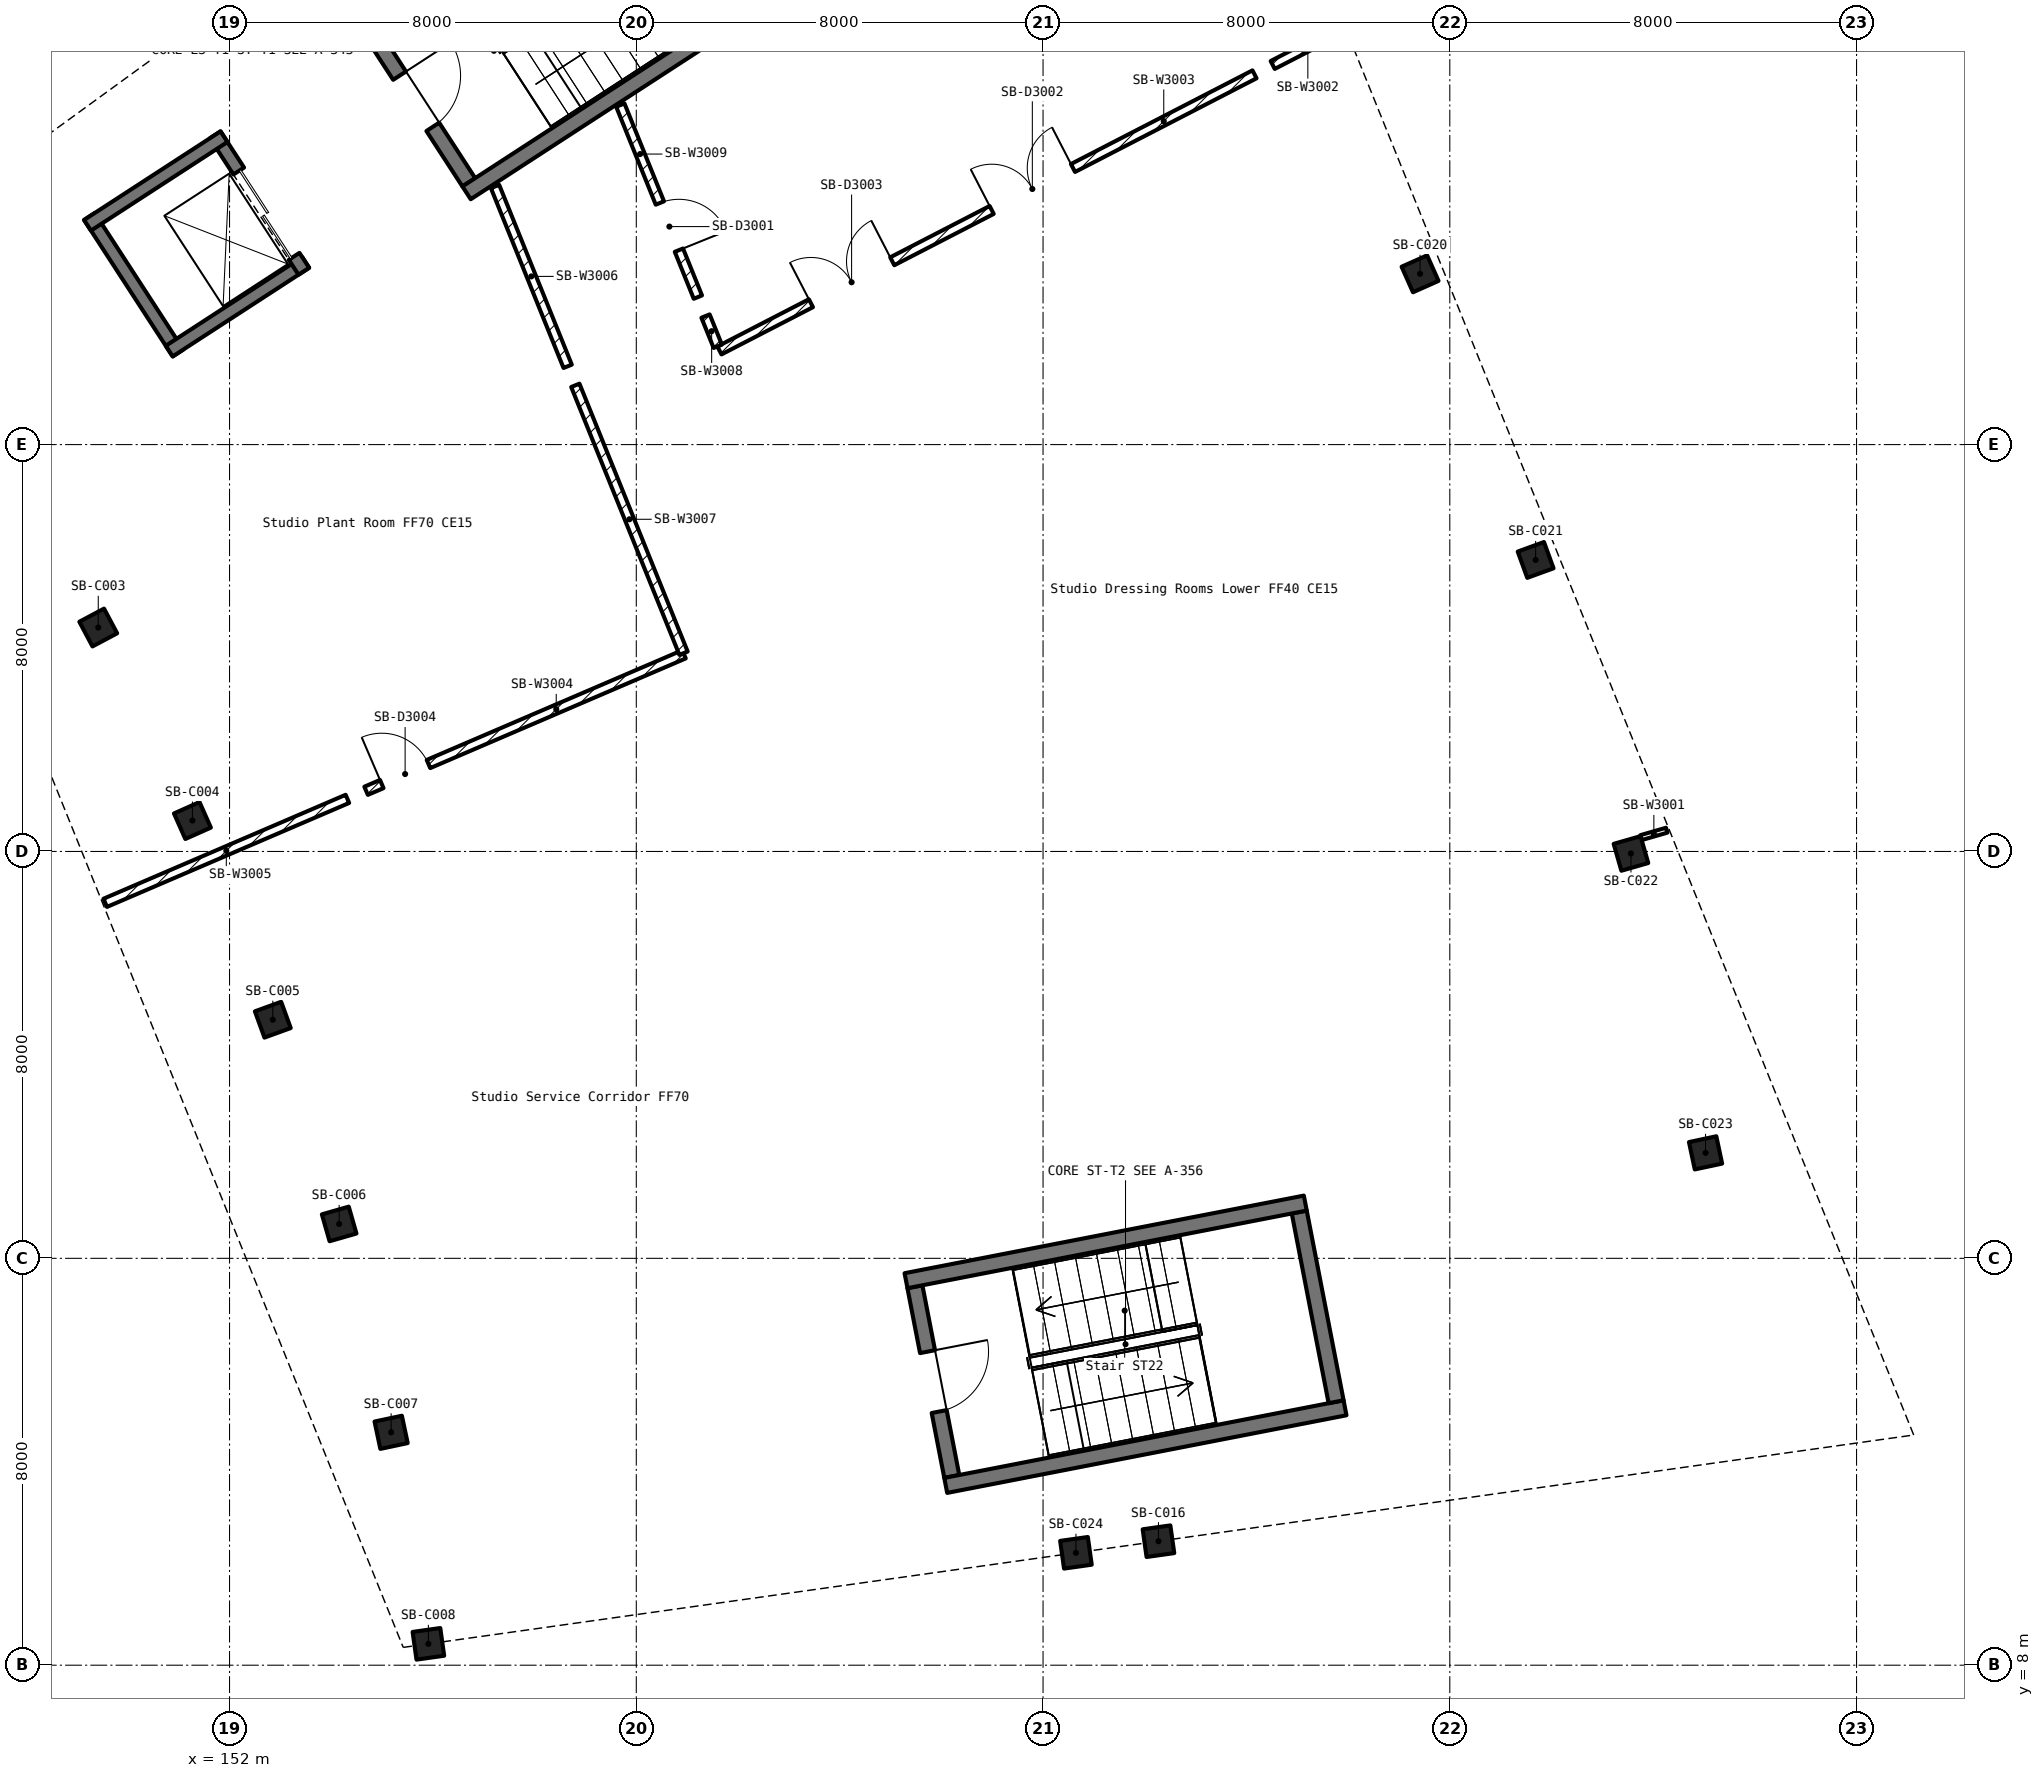
"""IFC4 building model, lengths in metres.
Left out: names, types, materials, properties, quantities, classifications, styles, units other than length and angle.
Written with IfcOpenShell. Run it as: python <this file> out.ifc"""

import sys

from ifc_helpers import new_model, si_unit, direction, frame, frame_2d, origin, origin_2d, place, context, subcontext, project, spatial, rectangle, extrude, element, fill, save


model = new_model("IFC4")
c1 = context("Model", 3, precision=1e-05, world=origin(), true_north=direction((0.0, 1.0)))
c2 = subcontext(c1, "Body", "Model", "MODEL_VIEW")
j1 = project(units=[si_unit("LENGTHUNIT", "METRE"), si_unit("PLANEANGLEUNIT", "RADIAN")], contexts=[c1])
p1 = place(None, origin())
s1 = spatial("IfcSite", under=j1, at=p1, CompositionType="ELEMENT")
p2 = place(p1, origin())
s2 = spatial("IfcBuilding", under=s1, at=p2, CompositionType="ELEMENT")
p3 = place(p2, frame((0.0, 0.0, -6.0)))
s3 = spatial("IfcBuildingStorey", under=s2, at=p3, CompositionType="ELEMENT", Elevation=-6.0)
for number, where, z_axis, x_axis in (
    (1, (149.418, 28.403, 0.0), (0.0, 0.0, 1.0), (0.469, -0.883, 0.0)),
    (2, (151.27, 24.608, 0.0), (0.0, 0.0, 1.0), (0.407, -0.914, 0.0)),
    (3, (152.851, 20.692, 0.0), (0.0, 0.0, 1.0), (0.342, -0.94, 0.0)),
    (4, (154.156, 16.676, 0.0), (0.0, 0.0, 1.0), (0.276, -0.961, 0.0)),
    (5, (155.178, 12.579, 0.0), (0.0, 0.0, 1.0), (0.208, -0.978, 0.0)),
    (6, (155.911, 8.42, 0.0), (0.0, 0.0, 1.0), (0.139, -0.99, 0.0)),
    (7, (170.27, 10.438, 0.0), (0.0, 0.0, 1.0), (0.139, -0.99, 0.0)),
    (8, (175.415, 35.358, 0.0), (0.0, 0.0, 1.0), (0.407, -0.914, 0.0)),
    (9, (177.688, 29.732, 0.0), (0.0, 0.0, 1.0), (0.342, -0.94, 0.0)),
    (10, (179.563, 23.961, 0.0), (0.0, 0.0, 1.0), (0.276, -0.961, 0.0)),
    (11, (181.03, 18.074, 0.0), (0.0, 0.0, 1.0), (0.208, -0.978, 0.0)),
    (12, (168.647, 10.21, 0.0), (0.0, 0.0, 1.0), (0.139, -0.99, 0.0)),
):
    element("IfcColumn", number, at=place(p3, frame(where, z_axis=z_axis, x_axis=x_axis)), inside=s3, PredefinedType="COLUMN", context=c2, shape_type="SweptSolid", body=[
        extrude(rectangle(XDim=0.55, YDim=0.55, at=origin_2d()), origin(), (0.0, 0.0, 1.0), 6.0),
    ])
p4 = place(p2, origin())
s4 = spatial("IfcBuildingStorey", under=s2, at=p4, CompositionType="ELEMENT", Elevation=0.0)
p5 = place(p4, frame((171.933, 40.375, -6.3), z_axis=(0.0, 0.0, 1.0), x_axis=(-0.882926128241, -0.469511929634, 0.0)))
e13 = element("IfcWall", 13, at=p5, inside=s4, PredefinedType="SHEAR", context=c2, shape_type="SweptSolid", body=[
    extrude(rectangle(XDim=22.0, YDim=0.4, at=frame_2d((11.0, 0.0))), origin(), (0.0, 0.0, 1.0), 12.3),
])
p6 = place(p4, frame((152.509, 30.046, -6.3), z_axis=(0.0, 0.0, 1.0), x_axis=(0.374613299166, -0.92718114524, 0.0)))
e14 = element("IfcWall", 14, at=p6, inside=s4, PredefinedType="SHEAR", context=c2, shape_type="SweptSolid", body=[
    extrude(rectangle(XDim=13.379, YDim=0.4, at=frame_2d((6.689, 0.0))), origin(), (0.0, 0.0, 1.0), 12.3),
])
p7 = place(p6, frame((6.191, 0.0, 6.3)))
e15 = element("IfcOpeningElement", 15, at=p7, cuts=e14, PredefinedType="OPENING", context=c2, shape_type="SweptSolid", body=[
    extrude(rectangle(XDim=1.0, YDim=2.1, at=frame_2d((0.5, 1.05))), frame((0.0, 0.212, 0.0), z_axis=(0.0, -1.0, 0.0), x_axis=(1.0, 0.0, 0.0)), (0.0, 0.0, 1.0), 0.424),
])
p8 = place(p4, frame((157.521, 17.641, -6.3), z_axis=(0.0, 0.0, 1.0), x_axis=(0.961263044958, 0.275632651182, 0.0)))
e16 = element("IfcWall", 16, at=p8, inside=s4, PredefinedType="SHEAR", context=c2, shape_type="SweptSolid", body=[
    extrude(rectangle(XDim=22.0, YDim=0.4, at=frame_2d((11.0, 0.0))), origin(), (0.0, 0.0, 1.0), 12.3),
])
p9 = place(p8, frame((8.531, 0.0, 6.3)))
e17 = element("IfcOpeningElement", 17, at=p9, cuts=e16, PredefinedType="OPENING", context=c2, shape_type="SweptSolid", body=[
    extrude(rectangle(XDim=0.9, YDim=2.1, at=frame_2d((0.45, 1.05))), frame((0.0, 0.212, 0.0), z_axis=(0.0, -1.0, 0.0), x_axis=(1.0, 0.0, 0.0)), (0.0, 0.0, 1.0), 0.424),
])
p10 = place(p4, frame((178.669, 23.705, -6.3), z_axis=(0.0, 0.0, 1.0), x_axis=(-0.374642655757, 0.92716928362, 0.0)))
e18 = element("IfcWall", 18, at=p10, inside=s4, PredefinedType="SHEAR", context=c2, shape_type="SweptSolid", body=[
    extrude(rectangle(XDim=17.979, YDim=0.4, at=frame_2d((8.99, 0.0))), origin(), (0.0, 0.0, 1.0), 12.3),
])
p11 = place(p10, frame((8.09, 0.0, 6.3)))
e19 = element("IfcOpeningElement", 19, at=p11, cuts=e18, PredefinedType="OPENING", context=c2, shape_type="SweptSolid", body=[
    extrude(rectangle(XDim=1.8, YDim=2.1, at=frame_2d((0.9, 1.05))), frame((0.0, 0.212, 0.0), z_axis=(0.0, -1.0, 0.0), x_axis=(1.0, 0.0, 0.0)), (0.0, 0.0, 1.0), 0.424),
])
p12 = place(p10, frame((12.59, 0.0, 6.3)))
e20 = element("IfcOpeningElement", 20, at=p12, cuts=e18, PredefinedType="OPENING", context=c2, shape_type="SweptSolid", body=[
    extrude(rectangle(XDim=1.8, YDim=2.1, at=frame_2d((0.9, 1.05))), frame((0.0, 0.212, 0.0), z_axis=(0.0, -1.0, 0.0), x_axis=(1.0, 0.0, 0.0)), (0.0, 0.0, 1.0), 0.424),
])
p13 = place(p3, frame((154.636, 40.344, 0.0), z_axis=(0.0, 0.0, 1.0), x_axis=(0.544712834543, -0.838622637355, 0.0)))
e21 = element("IfcWall", 21, at=p13, inside=s3, PredefinedType="SOLIDWALL", context=c2, shape_type="SweptSolid", body=[
    extrude(rectangle(XDim=3.8, YDim=0.3, at=frame_2d((1.9, 0.0))), origin(), (0.0, 0.0, 1.0), 6.0),
])
p14 = place(p13, frame((1.3, 0.0, 0.0)))
e22 = element("IfcOpeningElement", 22, at=p14, cuts=e21, PredefinedType="OPENING", context=c2, shape_type="SweptSolid", body=[
    extrude(rectangle(XDim=1.2, YDim=2.1, at=frame_2d((0.6, 1.05))), frame((0.0, 0.162, 0.0), z_axis=(0.0, -1.0, 0.0), x_axis=(1.0, 0.0, 0.0)), (0.0, 0.0, 1.0), 0.324),
])
p15 = place(p3, frame((156.662, 36.95, 0.0), z_axis=(0.0, 0.0, 1.0), x_axis=(0.838666673849, 0.544645031351, 0.0)))
e23 = element("IfcWall", 23, at=p15, inside=s3, PredefinedType="SOLIDWALL", context=c2, shape_type="SweptSolid", body=[
    extrude(rectangle(XDim=8.0, YDim=0.3, at=frame_2d((4.0, 0.0))), origin(), (0.0, 0.0, 1.0), 6.0),
])
p16 = place(p3, frame((165.48, 15.441, 0.0), z_axis=(0.0, 0.0, 1.0), x_axis=(0.190824946063, -0.981624082814, 0.0)))
e24 = element("IfcWall", 24, at=p16, inside=s3, PredefinedType="SOLIDWALL", context=c2, shape_type="SweptSolid", body=[
    extrude(rectangle(XDim=3.8, YDim=0.3, at=frame_2d((1.9, 0.0))), origin(), (0.0, 0.0, 1.0), 6.0),
])
p17 = place(p16, frame((1.3, 0.0, 0.0)))
e25 = element("IfcOpeningElement", 25, at=p17, cuts=e24, PredefinedType="OPENING", context=c2, shape_type="SweptSolid", body=[
    extrude(rectangle(XDim=1.2, YDim=2.1, at=frame_2d((0.6, 1.05))), frame((0.0, 0.162, 0.0), z_axis=(0.0, -1.0, 0.0), x_axis=(1.0, 0.0, 0.0)), (0.0, 0.0, 1.0), 0.324),
])
p18 = place(p3, frame((166.086, 11.535, 0.0), z_axis=(0.0, 0.0, 1.0), x_axis=(0.981635396686, 0.190766737073, 0.0)))
e26 = element("IfcWall", 26, at=p18, inside=s3, PredefinedType="SOLIDWALL", context=c2, shape_type="SweptSolid", body=[
    extrude(rectangle(XDim=8.0, YDim=0.3, at=frame_2d((4.0, 0.0))), origin(), (0.0, 0.0, 1.0), 6.0),
])
p19 = place(p3, frame((173.764, 13.18, 0.0), z_axis=(0.0, 0.0, 1.0), x_axis=(-0.190763033741, 0.981636116368, 0.0)))
e27 = element("IfcWall", 27, at=p19, inside=s3, PredefinedType="SOLIDWALL", context=c2, shape_type="SweptSolid", body=[
    extrude(rectangle(XDim=3.8, YDim=0.3, at=frame_2d((1.9, 0.0))), origin(), (0.0, 0.0, 1.0), 6.0),
])
p20 = place(p3, frame((173.158, 17.086, 0.0), z_axis=(0.0, 0.0, 1.0), x_axis=(-0.981641111144, -0.190737329623, 0.0)))
e28 = element("IfcWall", 28, at=p20, inside=s3, PredefinedType="SOLIDWALL", context=c2, shape_type="SweptSolid", body=[
    extrude(rectangle(XDim=8.0, YDim=0.3, at=frame_2d((4.0, 0.0))), origin(), (0.0, 0.0, 1.0), 6.0),
])
for number, where, z_axis, x_axis in (
    (29, (149.244, 36.485, 0.0), (0.0, 0.0, 1.0), (0.545, -0.839, 0.0)),
    (30, (150.814, 33.838, 0.0), (0.0, 0.0, 1.0), (0.839, 0.545, 0.0)),
):
    element("IfcWall", number, at=place(p3, frame(where, z_axis=z_axis, x_axis=x_axis)), inside=s3, PredefinedType="SOLIDWALL", context=c2, shape_type="SweptSolid", body=[
        extrude(rectangle(XDim=3.2, YDim=0.25, at=frame_2d((1.6, 0.0))), origin(), (0.0, 0.0, 1.0), 6.0),
    ])
p21 = place(p3, frame((153.461, 35.408, 0.0), z_axis=(0.0, 0.0, 1.0), x_axis=(-0.544746938909, 0.838600484467, 0.0)))
e31 = element("IfcWall", 31, at=p21, inside=s3, PredefinedType="SOLIDWALL", context=c2, shape_type="SweptSolid", body=[
    extrude(rectangle(XDim=3.199, YDim=0.25, at=frame_2d((1.6, 0.0))), origin(), (0.0, 0.0, 1.0), 6.0),
])
p22 = place(p21, frame((0.35, 0.0, 0.0)))
e32 = element("IfcOpeningElement", 32, at=p22, cuts=e31, PredefinedType="OPENING", context=c2, shape_type="SweptSolid", body=[
    extrude(rectangle(XDim=2.0, YDim=2.2, at=frame_2d((1.0, 1.1))), frame((0.0, 0.137, 0.0), z_axis=(0.0, -1.0, 0.0), x_axis=(1.0, 0.0, 0.0)), (0.0, 0.0, 1.0), 0.274),
])
p23 = place(p3, frame((151.891, 38.054, 0.0), z_axis=(0.0, 0.0, 1.0), x_axis=(-0.838830397361, -0.544392840201, 0.0)))
e33 = element("IfcWall", 33, at=p23, inside=s3, PredefinedType="SOLIDWALL", context=c2, shape_type="SweptSolid", body=[
    extrude(rectangle(XDim=3.2, YDim=0.25, at=frame_2d((1.6, 0.0))), origin(), (0.0, 0.0, 1.0), 6.0),
])
p24 = place(p3, frame((180.266, 24.418, 0.0), z_axis=(0.0, 0.0, 1.0), x_axis=(-0.960678409091, -0.277663455117, 0.0)))
e34 = element("IfcWall", 34, at=p24, inside=s3, PredefinedType="PARTITIONING", context=c2, shape_type="SweptSolid", body=[
    extrude(rectangle(XDim=0.526, YDim=0.1, at=frame_2d((0.263, 0.0))), origin(), (0.0, 0.0, 1.0), 4.88),
])
p25 = place(p3, frame((172.517, 39.464, 0.0), z_axis=(0.0, 0.0, 1.0), x_axis=(0.888703214067, 0.458482930225, 0.0)))
e35 = element("IfcWall", 35, at=p25, inside=s3, PredefinedType="PARTITIONING", context=c2, shape_type="SweptSolid", body=[
    extrude(rectangle(XDim=1.555, YDim=0.175, at=frame_2d((0.777, 0.0))), origin(), (0.0, 0.0, 1.0), 4.88),
])
p26 = place(p3, frame((161.635, 33.851, 0.0), z_axis=(0.0, 0.0, 1.0), x_axis=(0.888715235669, 0.458459627327, 0.0)))
e36 = element("IfcWall", 36, at=p26, inside=s3, PredefinedType="PARTITIONING", context=c2, shape_type="SweptSolid", body=[
    extrude(rectangle(XDim=11.842, YDim=0.175, at=frame_2d((5.921, 0.0))), origin(), (0.0, 0.0, 1.0), 4.88),
])
p27 = place(p26, frame((6.025, 0.0, 0.0)))
e37 = element("IfcOpeningElement", 37, at=p27, cuts=e36, PredefinedType="OPENING", context=c2, shape_type="SweptSolid", body=[
    extrude(rectangle(XDim=1.8, YDim=2.1, at=frame_2d((0.9, 1.05))), frame((0.0, 0.1, 0.0), z_axis=(0.0, -1.0, 0.0), x_axis=(1.0, 0.0, 0.0)), (0.0, 0.0, 1.0), 0.199),
])
p28 = place(p26, frame((2.025, 0.0, 0.0)))
e38 = element("IfcOpeningElement", 38, at=p28, cuts=e36, PredefinedType="OPENING", context=c2, shape_type="SweptSolid", body=[
    extrude(rectangle(XDim=1.8, YDim=2.1, at=frame_2d((0.9, 1.05))), frame((0.0, 0.1, 0.0), z_axis=(0.0, -1.0, 0.0), x_axis=(1.0, 0.0, 0.0)), (0.0, 0.0, 1.0), 0.199),
])
p29 = place(p3, frame((154.686, 25.193, 0.0), z_axis=(0.0, 0.0, 1.0), x_axis=(0.918961170443, 0.394348028038, 0.0)))
e39 = element("IfcWall", 39, at=p29, inside=s3, PredefinedType="PARTITIONING", context=c2, shape_type="SweptSolid", body=[
    extrude(rectangle(XDim=6.803, YDim=0.175, at=frame_2d((3.402, 0.0))), origin(), (0.0, 0.0, 1.0), 4.88),
])
p30 = place(p29, frame((0.335, 0.0, 0.0)))
e40 = element("IfcOpeningElement", 40, at=p30, cuts=e39, PredefinedType="OPENING", context=c2, shape_type="SweptSolid", body=[
    extrude(rectangle(XDim=1.0, YDim=2.1, at=frame_2d((0.5, 1.05))), frame((0.0, 0.1, 0.0), z_axis=(0.0, -1.0, 0.0), x_axis=(1.0, 0.0, 0.0)), (0.0, 0.0, 1.0), 0.199),
])
p31 = place(p3, frame((149.555, 22.99, 0.0), z_axis=(0.0, 0.0, 1.0), x_axis=(0.918964645879, 0.394339929026, 0.0)))
e41 = element("IfcWall", 41, at=p31, inside=s3, PredefinedType="PARTITIONING", context=c2, shape_type="SweptSolid", body=[
    extrude(rectangle(XDim=5.183, YDim=0.175, at=frame_2d((2.592, 0.0))), origin(), (0.0, 0.0, 1.0), 4.88),
])
p32 = place(p3, frame((158.65, 33.539, 0.0), z_axis=(0.0, 0.0, 1.0), x_axis=(-0.374468342404, 0.927239699612, 0.0)))
e42 = element("IfcWall", 42, at=p32, inside=s3, PredefinedType="PARTITIONING", context=c2, shape_type="SweptSolid", body=[
    extrude(rectangle(XDim=3.813, YDim=0.175, at=frame_2d((1.907, 0.0))), origin(), (0.0, 0.0, 1.0), 4.88),
])
p33 = place(p3, frame((160.929, 27.898, 0.0), z_axis=(0.0, 0.0, 1.0), x_axis=(-0.374589531725, 0.927190747755, 0.0)))
e43 = element("IfcWall", 43, at=p33, inside=s3, PredefinedType="PARTITIONING", context=c2, shape_type="SweptSolid", body=[
    extrude(rectangle(XDim=5.681, YDim=0.175, at=frame_2d((2.84, 0.0))), origin(), (0.0, 0.0, 1.0), 4.88),
])
p34 = place(p3, frame((161.362, 34.527, 0.0), z_axis=(0.0, 0.0, 1.0), x_axis=(0.374607966928, -0.927183299631, 0.0)))
e44 = element("IfcWall", 44, at=p34, inside=s3, PredefinedType="PARTITIONING", context=c2, shape_type="SweptSolid", body=[
    extrude(rectangle(XDim=0.641, YDim=0.175, at=frame_2d((0.32, 0.0))), origin(), (0.0, 0.0, 1.0), 4.88),
])
p35 = place(p3, frame((159.686, 38.675, 0.0), z_axis=(0.0, 0.0, 1.0), x_axis=(0.374531458348, -0.927214207563, 0.0)))
e45 = element("IfcWall", 45, at=p35, inside=s3, PredefinedType="PARTITIONING", context=c2, shape_type="SweptSolid", body=[
    extrude(rectangle(XDim=4.072, YDim=0.175, at=frame_2d((2.036, 0.0))), origin(), (0.0, 0.0, 1.0), 4.88),
])
p36 = place(p35, frame((2.076, 0.0, 0.0)))
e46 = element("IfcOpeningElement", 46, at=p36, cuts=e45, PredefinedType="OPENING", context=c2, shape_type="SweptSolid", body=[
    extrude(rectangle(XDim=1.0, YDim=2.1, at=frame_2d((0.5, 1.05))), frame((0.0, 0.1, 0.0), z_axis=(0.0, -1.0, 0.0), x_axis=(1.0, 0.0, 0.0)), (0.0, 0.0, 1.0), 0.199),
])
p37 = place(p14, origin())
e47 = element("IfcDoor", 47, at=p37, inside=s3, OperationType="SINGLE_SWING_LEFT", PredefinedType="DOOR", context=c2, shape_type="SweptSolid", body=[
    extrude(rectangle(XDim=1.2, YDim=2.1, at=frame_2d((0.6, 1.05))), frame((0.0, 0.025, 0.0), z_axis=(0.0, -1.0, 0.0), x_axis=(1.0, 0.0, 0.0)), (0.0, 0.0, 1.0), 0.05),
])
fill(e22, e47)
p38 = place(p17, origin())
e48 = element("IfcDoor", 48, at=p38, inside=s3, OperationType="SINGLE_SWING_LEFT", PredefinedType="DOOR", context=c2, shape_type="SweptSolid", body=[
    extrude(rectangle(XDim=1.2, YDim=2.1, at=frame_2d((0.6, 1.05))), frame((0.0, 0.025, 0.0), z_axis=(0.0, -1.0, 0.0), x_axis=(1.0, 0.0, 0.0)), (0.0, 0.0, 1.0), 0.05),
])
fill(e25, e48)
p39 = place(p22, origin())
e49 = element("IfcDoor", 49, at=p39, inside=s3, OperationType="DOUBLE_DOOR_SLIDING", PredefinedType="DOOR", context=c2, shape_type="SweptSolid", body=[
    extrude(rectangle(XDim=2.0, YDim=2.2, at=frame_2d((1.0, 1.1))), frame((0.0, 0.025, 0.0), z_axis=(0.0, -1.0, 0.0), x_axis=(1.0, 0.0, 0.0)), (0.0, 0.0, 1.0), 0.05),
])
fill(e32, e49)
p40 = place(p36, origin())
e50 = element("IfcDoor", 50, at=p40, inside=s3, OperationType="SINGLE_SWING_RIGHT", PredefinedType="DOOR", context=c2, shape_type="SweptSolid", body=[
    extrude(rectangle(XDim=1.0, YDim=2.1, at=frame_2d((0.5, 1.05))), frame((0.0, 0.025, 0.0), z_axis=(0.0, -1.0, 0.0), x_axis=(1.0, 0.0, 0.0)), (0.0, 0.0, 1.0), 0.05),
])
fill(e46, e50)
p41 = place(p27, origin())
e51 = element("IfcDoor", 51, at=p41, inside=s3, OperationType="DOUBLE_DOOR_SINGLE_SWING", PredefinedType="DOOR", context=c2, shape_type="SweptSolid", body=[
    extrude(rectangle(XDim=1.8, YDim=2.1, at=frame_2d((0.9, 1.05))), frame((0.0, 0.025, 0.0), z_axis=(0.0, -1.0, 0.0), x_axis=(1.0, 0.0, 0.0)), (0.0, 0.0, 1.0), 0.05),
])
fill(e37, e51)
p42 = place(p28, origin())
e52 = element("IfcDoor", 52, at=p42, inside=s3, OperationType="DOUBLE_DOOR_SINGLE_SWING", PredefinedType="DOOR", context=c2, shape_type="SweptSolid", body=[
    extrude(rectangle(XDim=1.8, YDim=2.1, at=frame_2d((0.9, 1.05))), frame((0.0, 0.025, 0.0), z_axis=(0.0, -1.0, 0.0), x_axis=(1.0, 0.0, 0.0)), (0.0, 0.0, 1.0), 0.05),
])
fill(e38, e52)
p43 = place(p30, origin())
e53 = element("IfcDoor", 53, at=p43, inside=s3, OperationType="SINGLE_SWING_LEFT", PredefinedType="DOOR", context=c2, shape_type="SweptSolid", body=[
    extrude(rectangle(XDim=1.0, YDim=2.1, at=frame_2d((0.5, 1.05))), frame((0.0, 0.025, 0.0), z_axis=(0.0, -1.0, 0.0), x_axis=(1.0, 0.0, 0.0)), (0.0, 0.0, 1.0), 0.05),
])
fill(e40, e53)
save(model, sys.argv[1])
